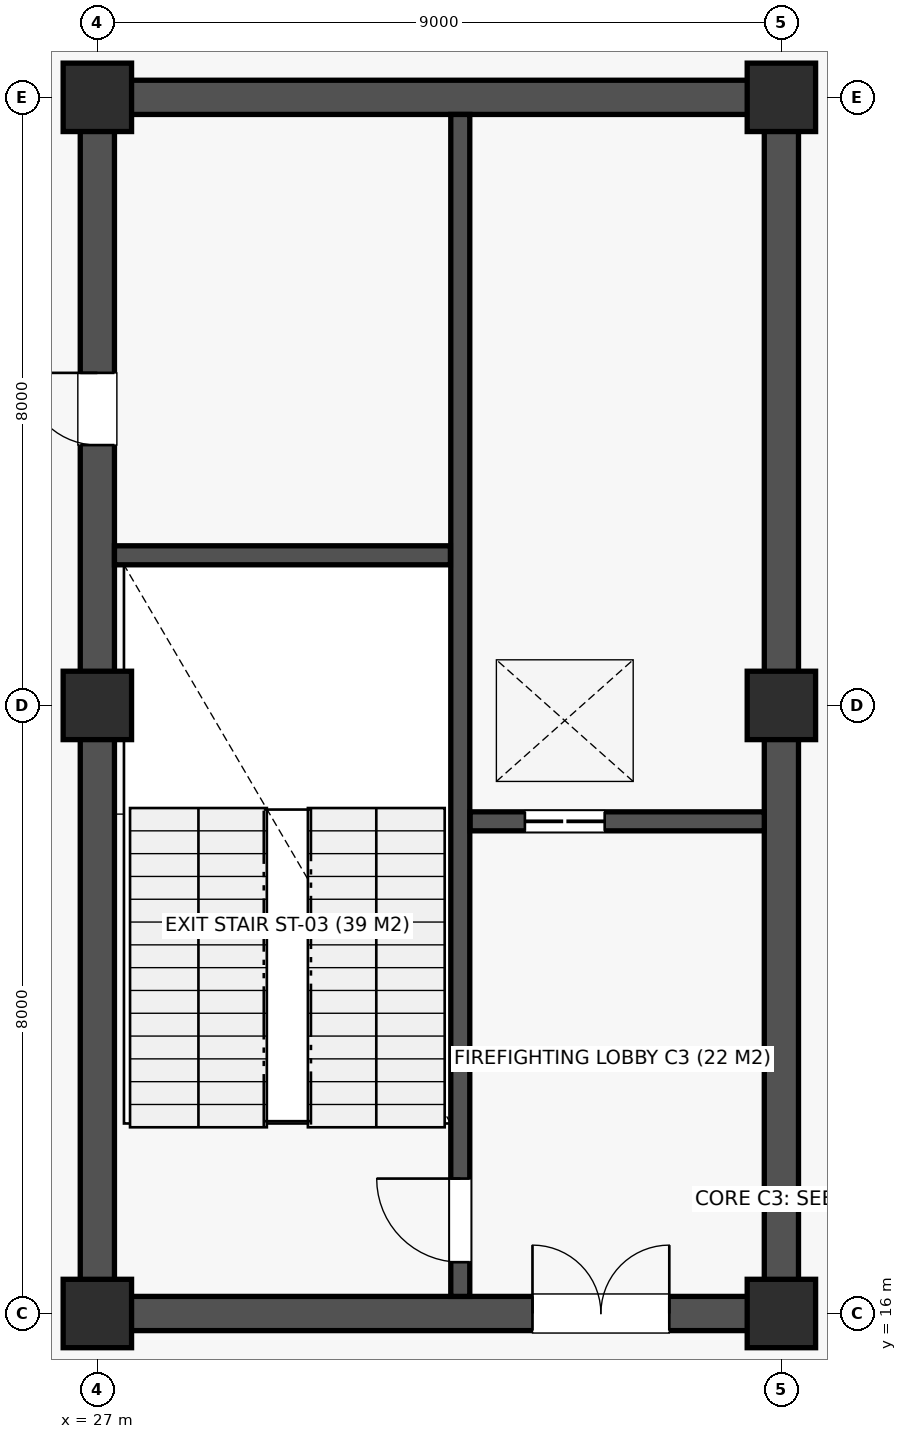
"""IFC4 building model, lengths in metres.
Left out: names, types, materials, properties, quantities, classifications, styles, units other than length and angle.
Written with IfcOpenShell. Run it as: python <this file> out.ifc"""

import sys

from ifc_helpers import new_model, si_unit, direction, frame, frame_2d, origin, origin_2d, place, context, subcontext, project, spatial, rectangle, extrude, element, fill, save


model = new_model("IFC4")
c1 = context("Model", 3, precision=1e-05, world=origin(), true_north=direction((0.0, 1.0)))
c2 = subcontext(c1, "Body", "Model", "MODEL_VIEW")
j1 = project(units=[si_unit("LENGTHUNIT", "METRE"), si_unit("PLANEANGLEUNIT", "RADIAN")], contexts=[c1])
p1 = place(None, origin())
s1 = spatial("IfcSite", under=j1, at=p1, CompositionType="ELEMENT")
p2 = place(p1, origin())
s2 = spatial("IfcBuilding", under=s1, at=p2, CompositionType="ELEMENT")
p3 = place(p2, frame((0.0, 0.0, -4.5)))
s3 = spatial("IfcBuildingStorey", under=s2, at=p3, CompositionType="ELEMENT", Elevation=-4.5)
for number, where, z_axis, x_axis in (
    (1, (27.0, 16.0, 0.0), (0.0, 0.0, 1.0), (1.0, 0.0, 0.0)),
    (2, (27.0, 24.0, 0.0), (0.0, 0.0, 1.0), (1.0, 0.0, 0.0)),
    (3, (27.0, 32.0, 0.0), (0.0, 0.0, 1.0), (1.0, 0.0, 0.0)),
    (4, (36.0, 16.0, 0.0), (0.0, 0.0, 1.0), (1.0, 0.0, 0.0)),
    (5, (36.0, 24.0, 0.0), (0.0, 0.0, 1.0), (1.0, 0.0, 0.0)),
    (6, (36.0, 32.0, 0.0), (0.0, 0.0, 1.0), (1.0, 0.0, 0.0)),
):
    element("IfcColumn", number, at=place(p3, frame(where, z_axis=z_axis, x_axis=x_axis)), inside=s3, PredefinedType="COLUMN", context=c2, shape_type="SweptSolid", body=[
        extrude(rectangle(XDim=0.9, YDim=0.9, at=origin_2d()), origin(), (0.0, 0.0, 1.0), 4.5),
    ])
p4 = place(p3, frame((27.225, 16.0, 0.0), z_axis=(0.0, 0.0, 1.0), x_axis=(1.0, 0.0, 0.0)))
e7 = element("IfcWall", 7, at=p4, inside=s3, PredefinedType="SHEAR", context=c2, shape_type="SweptSolid", body=[
    extrude(rectangle(XDim=8.55, YDim=0.45, at=frame_2d((4.275, 0.0))), origin(), (0.0, 0.0, 1.0), 4.15),
])
p5 = place(p4, frame((5.5, 0.0, 0.0)))
e8 = element("IfcOpeningElement", 8, at=p5, cuts=e7, PredefinedType="OPENING", context=c2, shape_type="SweptSolid", body=[
    extrude(rectangle(XDim=1.8, YDim=2.18, at=frame_2d((0.9, 1.09))), frame((0.0, 0.237, 0.0), z_axis=(0.0, -1.0, 0.0), x_axis=(1.0, 0.0, 0.0)), (0.0, 0.0, 1.0), 0.474),
])
p6 = place(p3, frame((27.225, 32.0, 0.0), z_axis=(0.0, 0.0, 1.0), x_axis=(1.0, 0.0, 0.0)))
e9 = element("IfcWall", 9, at=p6, inside=s3, PredefinedType="SHEAR", context=c2, shape_type="SweptSolid", body=[
    extrude(rectangle(XDim=8.55, YDim=0.45, at=frame_2d((4.275, 0.0))), origin(), (0.0, 0.0, 1.0), 4.15),
])
p7 = place(p3, frame((27.0, 16.225, 0.0), z_axis=(0.0, 0.0, 1.0), x_axis=(0.0, 1.0, 0.0)))
e10 = element("IfcWall", 10, at=p7, inside=s3, PredefinedType="SHEAR", context=c2, shape_type="SweptSolid", body=[
    extrude(rectangle(XDim=15.55, YDim=0.45, at=frame_2d((7.775, 0.0))), origin(), (0.0, 0.0, 1.0), 4.15),
])
p8 = place(p7, frame((11.2, 0.0, 0.0)))
e11 = element("IfcOpeningElement", 11, at=p8, cuts=e10, PredefinedType="OPENING", context=c2, shape_type="SweptSolid", body=[
    extrude(rectangle(XDim=0.95, YDim=2.1, at=frame_2d((0.475, 1.05))), frame((0.0, 0.237, 0.0), z_axis=(0.0, -1.0, 0.0), x_axis=(1.0, 0.0, 0.0)), (0.0, 0.0, 1.0), 0.474),
])
p9 = place(p3, frame((36.0, 16.225, 0.0), z_axis=(0.0, 0.0, 1.0), x_axis=(0.0, 1.0, 0.0)))
e12 = element("IfcWall", 12, at=p9, inside=s3, PredefinedType="SHEAR", context=c2, shape_type="SweptSolid", body=[
    extrude(rectangle(XDim=15.55, YDim=0.45, at=frame_2d((7.775, 0.0))), origin(), (0.0, 0.0, 1.0), 4.15),
])
p10 = place(p3, frame((31.775, 16.225, 0.0), z_axis=(0.0, 0.0, 1.0), x_axis=(0.0, 1.0, 0.0)))
e13 = element("IfcWall", 13, at=p10, inside=s3, PredefinedType="SOLIDWALL", context=c2, shape_type="SweptSolid", body=[
    extrude(rectangle(XDim=15.55, YDim=0.25, at=frame_2d((7.775, 0.0))), origin(), (0.0, 0.0, 1.0), 4.15),
])
p11 = place(p10, frame((0.45, 0.0, 0.0)))
e14 = element("IfcOpeningElement", 14, at=p11, cuts=e13, PredefinedType="OPENING", context=c2, shape_type="SweptSolid", body=[
    extrude(rectangle(XDim=1.1, YDim=2.15, at=frame_2d((0.55, 1.075))), frame((0.0, 0.137, 0.0), z_axis=(0.0, -1.0, 0.0), x_axis=(1.0, 0.0, 0.0)), (0.0, 0.0, 1.0), 0.274),
])
p12 = place(p3, frame((27.225, 25.975, 0.0), z_axis=(0.0, 0.0, 1.0), x_axis=(1.0, 0.0, 0.0)))
e15 = element("IfcWall", 15, at=p12, inside=s3, PredefinedType="SOLIDWALL", context=c2, shape_type="SweptSolid", body=[
    extrude(rectangle(XDim=4.42, YDim=0.25, at=frame_2d((2.21, 0.0))), origin(), (0.0, 0.0, 1.0), 4.15),
])
p13 = place(p3, frame((31.905, 22.475, 0.0), z_axis=(0.0, 0.0, 1.0), x_axis=(1.0, 0.0, 0.0)))
e16 = element("IfcWall", 16, at=p13, inside=s3, PredefinedType="SOLIDWALL", context=c2, shape_type="SweptSolid", body=[
    extrude(rectangle(XDim=3.87, YDim=0.25, at=frame_2d((1.935, 0.0))), origin(), (0.0, 0.0, 1.0), 4.15),
])
p14 = place(p13, frame((0.72, 0.0, 0.0)))
e17 = element("IfcOpeningElement", 17, at=p14, cuts=e16, PredefinedType="OPENING", context=c2, shape_type="SweptSolid", body=[
    extrude(rectangle(XDim=1.05, YDim=2.12, at=frame_2d((0.525, 1.06))), frame((0.0, 0.137, 0.0), z_axis=(0.0, -1.0, 0.0), x_axis=(1.0, 0.0, 0.0)), (0.0, 0.0, 1.0), 0.274),
])
p15 = place(p5, origin())
e18 = element("IfcDoor", 18, at=p15, inside=s3, OperationType="DOUBLE_DOOR_SINGLE_SWING", PredefinedType="DOOR", context=c2, shape_type="SweptSolid", body=[
    extrude(rectangle(XDim=1.8, YDim=2.18, at=frame_2d((0.9, 1.09))), frame((0.0, 0.025, 0.0), z_axis=(0.0, -1.0, 0.0), x_axis=(1.0, 0.0, 0.0)), (0.0, 0.0, 1.0), 0.05),
])
fill(e8, e18)
p16 = place(p11, origin())
e19 = element("IfcDoor", 19, at=p16, inside=s3, OperationType="SINGLE_SWING_RIGHT", PredefinedType="DOOR", context=c2, shape_type="SweptSolid", body=[
    extrude(rectangle(XDim=1.1, YDim=2.15, at=frame_2d((0.55, 1.075))), frame((0.0, 0.025, 0.0), z_axis=(0.0, -1.0, 0.0), x_axis=(1.0, 0.0, 0.0)), (0.0, 0.0, 1.0), 0.05),
])
fill(e14, e19)
p17 = place(p8, origin())
e20 = element("IfcDoor", 20, at=p17, inside=s3, OperationType="SINGLE_SWING_RIGHT", PredefinedType="DOOR", context=c2, shape_type="SweptSolid", body=[
    extrude(rectangle(XDim=0.95, YDim=2.1, at=frame_2d((0.475, 1.05))), frame((0.0, 0.025, 0.0), z_axis=(0.0, -1.0, 0.0), x_axis=(1.0, 0.0, 0.0)), (0.0, 0.0, 1.0), 0.05),
])
fill(e11, e20)
p18 = place(p14, origin())
e21 = element("IfcDoor", 21, at=p18, inside=s3, OperationType="DOUBLE_DOOR_SLIDING", PredefinedType="DOOR", context=c2, shape_type="SweptSolid", body=[
    extrude(rectangle(XDim=1.05, YDim=2.12, at=frame_2d((0.525, 1.06))), frame((0.0, 0.025, 0.0), z_axis=(0.0, -1.0, 0.0), x_axis=(1.0, 0.0, 0.0)), (0.0, 0.0, 1.0), 0.05),
])
fill(e17, e21)
save(model, sys.argv[1])
